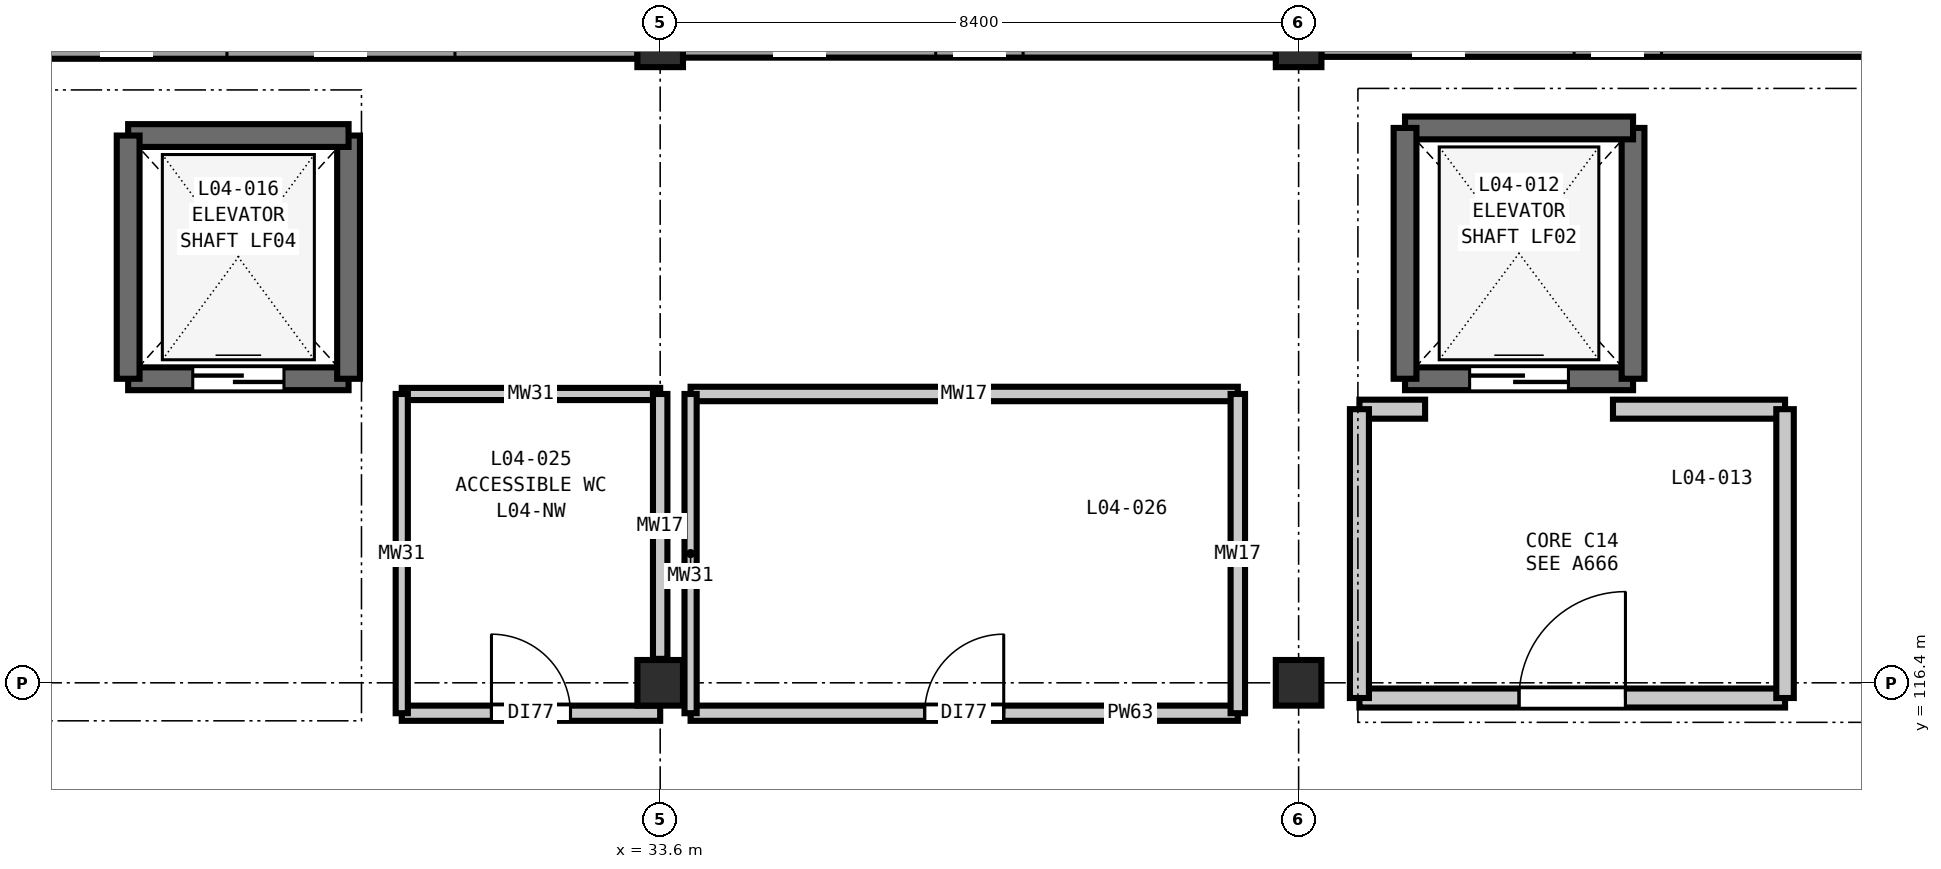
"""IFC4 building model, lengths in metres.
Left out: names, types, materials, properties, quantities, classifications, styles, units other than length and angle.
Written with IfcOpenShell. Run it as: python <this file> out.ifc"""

import sys

from ifc_helpers import new_model, si_unit, direction, frame, frame_2d, origin, origin_2d, place, context, subcontext, project, spatial, rectangle, extrude, element, fill, save


model = new_model("IFC4")
c1 = context("Model", 3, precision=1e-05, world=origin(), true_north=direction((0.0, 1.0)))
c2 = subcontext(c1, "Body", "Model", "MODEL_VIEW")
j1 = project(units=[si_unit("LENGTHUNIT", "METRE"), si_unit("PLANEANGLEUNIT", "RADIAN")], contexts=[c1])
p1 = place(None, origin())
s1 = spatial("IfcSite", under=j1, at=p1, CompositionType="ELEMENT")
p2 = place(p1, origin())
s2 = spatial("IfcBuilding", under=s1, at=p2, CompositionType="ELEMENT")
p3 = place(p2, frame((0.0, 0.0, 20.4)))
s3 = spatial("IfcBuildingStorey", under=s2, at=p3, CompositionType="ELEMENT", Elevation=20.4)
for number, where, z_axis, x_axis in (
    (1, (33.6, 116.4, 0.0), (0.0, 0.0, 1.0), (1.0, 0.0, 0.0)),
    (2, (33.6, 124.8, 0.0), (0.0, 0.0, 1.0), (1.0, 0.0, 0.0)),
    (3, (42.0, 116.4, 0.0), (0.0, 0.0, 1.0), (1.0, 0.0, 0.0)),
    (4, (42.0, 124.8, 0.0), (0.0, 0.0, 1.0), (1.0, 0.0, 0.0)),
):
    element("IfcColumn", number, at=place(p3, frame(where, z_axis=z_axis, x_axis=x_axis)), inside=s3, PredefinedType="COLUMN", context=c2, shape_type="SweptSolid", body=[
        extrude(rectangle(XDim=0.6, YDim=0.6, at=origin_2d()), origin(), (0.0, 0.0, 1.0), 4.2),
    ])
p4 = place(p3, frame((25.498, 124.8, 0.0), z_axis=(0.0, 0.0, 1.0), x_axis=(1.0, 0.0, 0.0)))
e5 = element("IfcWall", 5, at=p4, inside=s3, PredefinedType="SOLIDWALL", context=c2, shape_type="SweptSolid", body=[
    extrude(rectangle(XDim=7.804, YDim=0.38, at=frame_2d((3.902, 0.0))), origin(), (0.0, 0.0, 1.0), 3.48),
])
p5 = place(p4, frame((2.402, 0.0, 0.9)))
e6 = element("IfcOpeningElement", 6, at=p5, cuts=e5, PredefinedType="OPENING", context=c2, shape_type="SweptSolid", body=[
    extrude(rectangle(XDim=3.0, YDim=2.15, at=frame_2d((1.5, 1.075))), frame((0.0, 0.2, 0.0), z_axis=(0.0, -1.0, 0.0), x_axis=(1.0, 0.0, 0.0)), (0.0, 0.0, 1.0), 0.4),
])
p6 = place(p3, frame((33.898, 124.8, 0.0), z_axis=(0.0, 0.0, 1.0), x_axis=(1.0, 0.0, 0.0)))
e7 = element("IfcWall", 7, at=p6, inside=s3, PredefinedType="SOLIDWALL", context=c2, shape_type="SweptSolid", body=[
    extrude(rectangle(XDim=7.804, YDim=0.35, at=frame_2d((3.902, 0.0))), origin(), (0.0, 0.0, 1.0), 3.48),
])
p7 = place(p6, frame((3.327, 0.0, 0.9)))
e8 = element("IfcOpeningElement", 8, at=p7, cuts=e7, PredefinedType="OPENING", context=c2, shape_type="SweptSolid", body=[
    extrude(rectangle(XDim=1.15, YDim=1.4, at=frame_2d((0.575, 0.7))), frame((0.0, 0.185, 0.0), z_axis=(0.0, -1.0, 0.0), x_axis=(1.0, 0.0, 0.0)), (0.0, 0.0, 1.0), 0.37),
])
p8 = place(p3, frame((42.298, 124.8, 0.0), z_axis=(0.0, 0.0, 1.0), x_axis=(1.0, 0.0, 0.0)))
e9 = element("IfcWall", 9, at=p8, inside=s3, PredefinedType="SOLIDWALL", context=c2, shape_type="SweptSolid", body=[
    extrude(rectangle(XDim=7.804, YDim=0.33, at=frame_2d((3.902, 0.0))), origin(), (0.0, 0.0, 1.0), 3.48),
])
p9 = place(p8, frame((3.327, 0.0, 0.9)))
e10 = element("IfcOpeningElement", 10, at=p9, cuts=e9, PredefinedType="OPENING", context=c2, shape_type="SweptSolid", body=[
    extrude(rectangle(XDim=1.15, YDim=1.4, at=frame_2d((0.575, 0.7))), frame((0.0, 0.175, 0.0), z_axis=(0.0, -1.0, 0.0), x_axis=(1.0, 0.0, 0.0)), (0.0, 0.0, 1.0), 0.35),
])
p10 = place(p3, frame((43.4, 120.4, 0.0), z_axis=(0.0, 0.0, 1.0), x_axis=(1.0, 0.0, 0.0)))
e11 = element("IfcWall", 11, at=p10, inside=s3, PredefinedType="SHEAR", context=c2, shape_type="SweptSolid", body=[
    extrude(rectangle(XDim=3.0, YDim=0.3, at=frame_2d((1.5, 0.0))), origin(), (0.0, 0.0, 1.0), 4.2),
])
p11 = place(p10, frame((0.85, 0.0, 0.0)))
e12 = element("IfcOpeningElement", 12, at=p11, cuts=e11, PredefinedType="OPENING", context=c2, shape_type="SweptSolid", body=[
    extrude(rectangle(XDim=1.3, YDim=2.2, at=frame_2d((0.65, 1.1))), frame((0.0, 0.16, 0.0), z_axis=(0.0, -1.0, 0.0), x_axis=(1.0, 0.0, 0.0)), (0.0, 0.0, 1.0), 0.32),
])
p12 = place(p3, frame((46.4, 120.4, 0.0), z_axis=(0.0, 0.0, 1.0), x_axis=(0.0, 1.0, 0.0)))
e13 = element("IfcWall", 13, at=p12, inside=s3, PredefinedType="SHEAR", context=c2, shape_type="SweptSolid", body=[
    extrude(rectangle(XDim=3.3, YDim=0.3, at=frame_2d((1.65, 0.0))), origin(), (0.0, 0.0, 1.0), 4.2),
])
p13 = place(p3, frame((46.4, 123.7, 0.0), z_axis=(0.0, 0.0, 1.0), x_axis=(-1.0, 0.0, 0.0)))
e14 = element("IfcWall", 14, at=p13, inside=s3, PredefinedType="SHEAR", context=c2, shape_type="SweptSolid", body=[
    extrude(rectangle(XDim=3.0, YDim=0.3, at=frame_2d((1.5, 0.0))), origin(), (0.0, 0.0, 1.0), 4.2),
])
p14 = place(p3, frame((43.4, 123.7, 0.0), z_axis=(0.0, 0.0, 1.0), x_axis=(0.0, -1.0, 0.0)))
e15 = element("IfcWall", 15, at=p14, inside=s3, PredefinedType="SHEAR", context=c2, shape_type="SweptSolid", body=[
    extrude(rectangle(XDim=3.3, YDim=0.3, at=frame_2d((1.65, 0.0))), origin(), (0.0, 0.0, 1.0), 4.2),
])
p15 = place(p3, frame((26.6, 120.4, 0.0), z_axis=(0.0, 0.0, 1.0), x_axis=(1.0, 0.0, 0.0)))
e16 = element("IfcWall", 16, at=p15, inside=s3, PredefinedType="SHEAR", context=c2, shape_type="SweptSolid", body=[
    extrude(rectangle(XDim=2.9, YDim=0.3, at=frame_2d((1.45, 0.0))), origin(), (0.0, 0.0, 1.0), 4.2),
])
p16 = place(p15, frame((0.85, 0.0, 0.0)))
e17 = element("IfcOpeningElement", 17, at=p16, cuts=e16, PredefinedType="OPENING", context=c2, shape_type="SweptSolid", body=[
    extrude(rectangle(XDim=1.2, YDim=2.2, at=frame_2d((0.6, 1.1))), frame((0.0, 0.16, 0.0), z_axis=(0.0, -1.0, 0.0), x_axis=(1.0, 0.0, 0.0)), (0.0, 0.0, 1.0), 0.32),
])
p17 = place(p3, frame((29.5, 120.4, 0.0), z_axis=(0.0, 0.0, 1.0), x_axis=(0.0, 1.0, 0.0)))
e18 = element("IfcWall", 18, at=p17, inside=s3, PredefinedType="SHEAR", context=c2, shape_type="SweptSolid", body=[
    extrude(rectangle(XDim=3.2, YDim=0.3, at=frame_2d((1.6, 0.0))), origin(), (0.0, 0.0, 1.0), 4.2),
])
p18 = place(p3, frame((29.5, 123.6, 0.0), z_axis=(0.0, 0.0, 1.0), x_axis=(-1.0, 0.0, 0.0)))
e19 = element("IfcWall", 19, at=p18, inside=s3, PredefinedType="SHEAR", context=c2, shape_type="SweptSolid", body=[
    extrude(rectangle(XDim=2.9, YDim=0.3, at=frame_2d((1.45, 0.0))), origin(), (0.0, 0.0, 1.0), 4.2),
])
p19 = place(p3, frame((26.6, 123.6, 0.0), z_axis=(0.0, 0.0, 1.0), x_axis=(0.0, -1.0, 0.0)))
e20 = element("IfcWall", 20, at=p19, inside=s3, PredefinedType="SHEAR", context=c2, shape_type="SweptSolid", body=[
    extrude(rectangle(XDim=3.2, YDim=0.3, at=frame_2d((1.6, 0.0))), origin(), (0.0, 0.0, 1.0), 4.2),
])
p20 = place(p3, frame((30.2, 116.0, 0.0), z_axis=(0.0, 0.0, 1.0), x_axis=(1.0, 0.0, 0.0)))
e21 = element("IfcWall", 21, at=p20, inside=s3, PredefinedType="PARTITIONING", context=c2, shape_type="SweptSolid", body=[
    extrude(rectangle(XDim=3.4, YDim=0.2, at=frame_2d((1.7, 0.0))), origin(), (0.0, 0.0, 1.0), 3.82),
])
p21 = place(p20, frame((1.18, 0.0, 0.0)))
e22 = element("IfcOpeningElement", 22, at=p21, cuts=e21, PredefinedType="OPENING", context=c2, shape_type="SweptSolid", body=[
    extrude(rectangle(XDim=1.04, YDim=2.1, at=frame_2d((0.52, 1.05))), frame((0.0, 0.11, 0.0), z_axis=(0.0, -1.0, 0.0), x_axis=(1.0, 0.0, 0.0)), (0.0, 0.0, 1.0), 0.22),
])
p22 = place(p3, frame((34.0, 116.0, 0.0), z_axis=(0.0, 0.0, 1.0), x_axis=(1.0, 0.0, 0.0)))
e23 = element("IfcWall", 23, at=p22, inside=s3, PredefinedType="PARTITIONING", context=c2, shape_type="SweptSolid", body=[
    extrude(rectangle(XDim=7.2, YDim=0.2, at=frame_2d((3.6, 0.0))), origin(), (0.0, 0.0, 1.0), 3.82),
])
p23 = place(p22, frame((3.08, 0.0, 0.0)))
e24 = element("IfcOpeningElement", 24, at=p23, cuts=e23, PredefinedType="OPENING", context=c2, shape_type="SweptSolid", body=[
    extrude(rectangle(XDim=1.04, YDim=2.1, at=frame_2d((0.52, 1.05))), frame((0.0, 0.11, 0.0), z_axis=(0.0, -1.0, 0.0), x_axis=(1.0, 0.0, 0.0)), (0.0, 0.0, 1.0), 0.22),
])
p24 = place(p3, frame((42.8, 116.2, 0.0), z_axis=(0.0, 0.0, 1.0), x_axis=(1.0, 0.0, 0.0)))
e25 = element("IfcWall", 25, at=p24, inside=s3, PredefinedType="PARTITIONING", context=c2, shape_type="SweptSolid", body=[
    extrude(rectangle(XDim=5.6, YDim=0.25, at=frame_2d((2.8, 0.0))), origin(), (0.0, 0.0, 1.0), 3.585),
])
p25 = place(p24, frame((2.1, 0.0, 0.0)))
e26 = element("IfcOpeningElement", 26, at=p25, cuts=e25, PredefinedType="OPENING", context=c2, shape_type="SweptSolid", body=[
    extrude(rectangle(XDim=1.4, YDim=2.2, at=frame_2d((0.7, 1.1))), frame((0.0, 0.135, 0.0), z_axis=(0.0, -1.0, 0.0), x_axis=(1.0, 0.0, 0.0)), (0.0, 0.0, 1.0), 0.27),
])
p26 = place(p3, frame((46.136, 120.0, 0.0), z_axis=(0.0, 0.0, 1.0), x_axis=(1.0, 0.0, 0.0)))
e27 = element("IfcWall", 27, at=p26, inside=s3, PredefinedType="PARTITIONING", context=c2, shape_type="SweptSolid", body=[
    extrude(rectangle(XDim=2.264, YDim=0.25, at=frame_2d((1.132, 0.0))), origin(), (0.0, 0.0, 1.0), 3.82),
])
p27 = place(p3, frame((42.8, 120.0, 0.0), z_axis=(0.0, 0.0, 1.0), x_axis=(1.0, 0.0, 0.0)))
e28 = element("IfcWall", 28, at=p27, inside=s3, PredefinedType="PARTITIONING", context=c2, shape_type="SweptSolid", body=[
    extrude(rectangle(XDim=0.864, YDim=0.25, at=frame_2d((0.432, 0.0))), origin(), (0.0, 0.0, 1.0), 3.82),
])
p28 = place(p3, frame((30.2, 120.2, 0.0), z_axis=(0.0, 0.0, 1.0), x_axis=(1.0, 0.0, 0.0)))
e29 = element("IfcWall", 29, at=p28, inside=s3, PredefinedType="PLUMBINGWALL", context=c2, shape_type="SweptSolid", body=[
    extrude(rectangle(XDim=3.4, YDim=0.16, at=frame_2d((1.7, 0.0))), origin(), (0.0, 0.0, 1.0), 3.82),
])
p29 = place(p3, frame((34.0, 120.2, 0.0), z_axis=(0.0, 0.0, 1.0), x_axis=(1.0, 0.0, 0.0)))
e30 = element("IfcWall", 30, at=p29, inside=s3, PredefinedType="PLUMBINGWALL", context=c2, shape_type="SweptSolid", body=[
    extrude(rectangle(XDim=7.2, YDim=0.19, at=frame_2d((3.6, 0.0))), origin(), (0.0, 0.0, 1.0), 3.82),
])
p30 = place(p3, frame((30.2, 116.0, 0.0), z_axis=(0.0, 0.0, 1.0), x_axis=(0.0, 1.0, 0.0)))
e31 = element("IfcWall", 31, at=p30, inside=s3, PredefinedType="PLUMBINGWALL", context=c2, shape_type="SweptSolid", body=[
    extrude(rectangle(XDim=4.2, YDim=0.16, at=frame_2d((2.1, 0.0))), origin(), (0.0, 0.0, 1.0), 3.82),
])
p31 = place(p3, frame((33.6, 116.715, 0.0), z_axis=(0.0, 0.0, 1.0), x_axis=(0.0, 1.0, 0.0)))
e32 = element("IfcWall", 32, at=p31, inside=s3, PredefinedType="PLUMBINGWALL", context=c2, shape_type="SweptSolid", body=[
    extrude(rectangle(XDim=3.485, YDim=0.19, at=frame_2d((1.742, 0.0))), origin(), (0.0, 0.0, 1.0), 3.585),
])
p32 = place(p3, frame((34.0, 116.0, 0.0), z_axis=(0.0, 0.0, 1.0), x_axis=(0.0, 1.0, 0.0)))
e33 = element("IfcWall", 33, at=p32, inside=s3, PredefinedType="PLUMBINGWALL", context=c2, shape_type="SweptSolid", body=[
    extrude(rectangle(XDim=4.2, YDim=0.16, at=frame_2d((2.1, 0.0))), origin(), (0.0, 0.0, 1.0), 3.82),
])
p33 = place(p3, frame((41.2, 116.0, 0.0), z_axis=(0.0, 0.0, 1.0), x_axis=(0.0, 1.0, 0.0)))
e34 = element("IfcWall", 34, at=p33, inside=s3, PredefinedType="PLUMBINGWALL", context=c2, shape_type="SweptSolid", body=[
    extrude(rectangle(XDim=4.2, YDim=0.19, at=frame_2d((2.1, 0.0))), origin(), (0.0, 0.0, 1.0), 3.82),
])
p34 = place(p3, frame((42.8, 116.2, 0.0), z_axis=(0.0, 0.0, 1.0), x_axis=(0.0, 1.0, 0.0)))
e35 = element("IfcWall", 35, at=p34, inside=s3, PredefinedType="PARTITIONING", context=c2, shape_type="SweptSolid", body=[
    extrude(rectangle(XDim=3.8, YDim=0.25, at=frame_2d((1.9, 0.0))), origin(), (0.0, 0.0, 1.0), 3.82),
])
p35 = place(p3, frame((48.4, 116.2, 0.0), z_axis=(0.0, 0.0, 1.0), x_axis=(0.0, 1.0, 0.0)))
e36 = element("IfcWall", 36, at=p35, inside=s3, PredefinedType="PARTITIONING", context=c2, shape_type="SweptSolid", body=[
    extrude(rectangle(XDim=3.8, YDim=0.23, at=frame_2d((1.9, 0.0))), origin(), (0.0, 0.0, 1.0), 3.82),
])
p36 = place(p11, origin())
e37 = element("IfcDoor", 37, at=p36, inside=s3, OperationType="DOUBLE_DOOR_SLIDING", PredefinedType="DOOR", context=c2, shape_type="SweptSolid", body=[
    extrude(rectangle(XDim=1.3, YDim=2.2, at=frame_2d((0.65, 1.1))), frame((0.0, 0.025, 0.0), z_axis=(0.0, -1.0, 0.0), x_axis=(1.0, 0.0, 0.0)), (0.0, 0.0, 1.0), 0.05),
])
fill(e12, e37)
p37 = place(p16, origin())
e38 = element("IfcDoor", 38, at=p37, inside=s3, OperationType="DOUBLE_DOOR_SLIDING", PredefinedType="DOOR", context=c2, shape_type="SweptSolid", body=[
    extrude(rectangle(XDim=1.2, YDim=2.2, at=frame_2d((0.6, 1.1))), frame((0.0, 0.025, 0.0), z_axis=(0.0, -1.0, 0.0), x_axis=(1.0, 0.0, 0.0)), (0.0, 0.0, 1.0), 0.05),
])
fill(e17, e38)
p38 = place(p21, origin())
e39 = element("IfcDoor", 39, at=p38, inside=s3, OperationType="SINGLE_SWING_LEFT", PredefinedType="DOOR", context=c2, shape_type="SweptSolid", body=[
    extrude(rectangle(XDim=1.04, YDim=2.1, at=frame_2d((0.52, 1.05))), frame((0.0, 0.025, 0.0), z_axis=(0.0, -1.0, 0.0), x_axis=(1.0, 0.0, 0.0)), (0.0, 0.0, 1.0), 0.05),
])
fill(e22, e39)
p39 = place(p23, origin())
e40 = element("IfcDoor", 40, at=p39, inside=s3, OperationType="SINGLE_SWING_RIGHT", PredefinedType="DOOR", context=c2, shape_type="SweptSolid", body=[
    extrude(rectangle(XDim=1.04, YDim=2.1, at=frame_2d((0.52, 1.05))), frame((0.0, 0.025, 0.0), z_axis=(0.0, -1.0, 0.0), x_axis=(1.0, 0.0, 0.0)), (0.0, 0.0, 1.0), 0.05),
])
fill(e24, e40)
p40 = place(p25, origin())
e41 = element("IfcDoor", 41, at=p40, inside=s3, OperationType="SINGLE_SWING_RIGHT", PredefinedType="DOOR", context=c2, shape_type="SweptSolid", body=[
    extrude(rectangle(XDim=1.4, YDim=2.2, at=frame_2d((0.7, 1.1))), frame((0.0, 0.025, 0.0), z_axis=(0.0, -1.0, 0.0), x_axis=(1.0, 0.0, 0.0)), (0.0, 0.0, 1.0), 0.05),
])
fill(e26, e41)
save(model, sys.argv[1])
